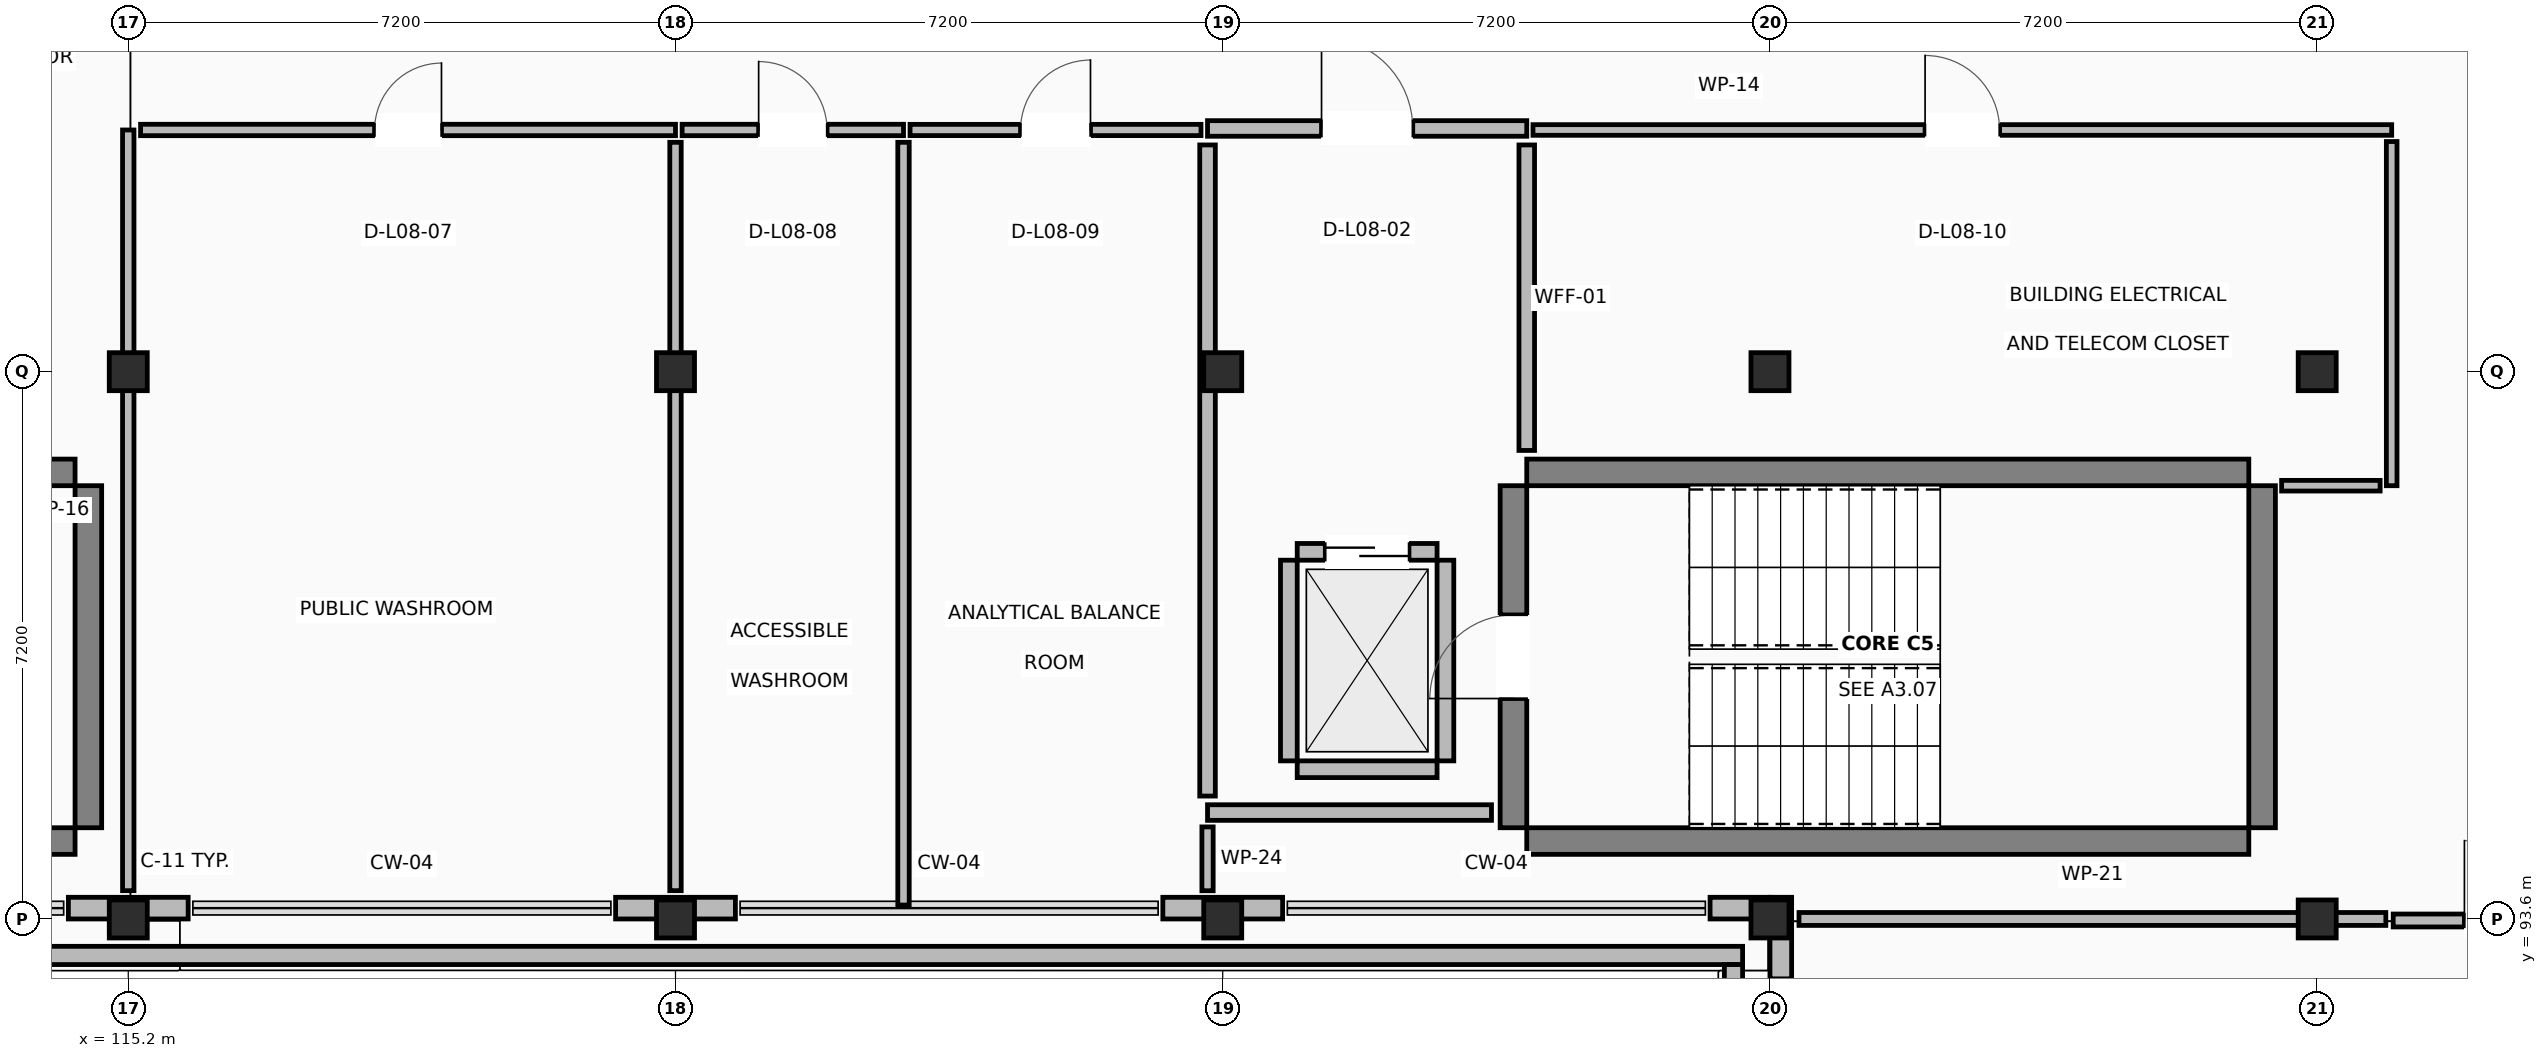
"""IFC4 building model, lengths in metres.
Left out: names, types, materials, properties, quantities, classifications, styles, units other than length and angle.
Written with IfcOpenShell. Run it as: python <this file> out.ifc"""

import sys

from ifc_helpers import new_model, si_unit, direction, frame, frame_2d, origin, origin_2d, place, context, subcontext, project, spatial, rectangle, extrude, element, fill, save


model = new_model("IFC4")
c1 = context("Model", 3, precision=1e-05, world=origin(), true_north=direction((0.0, 1.0)))
c2 = subcontext(c1, "Body", "Model", "MODEL_VIEW")
j1 = project(units=[si_unit("LENGTHUNIT", "METRE"), si_unit("PLANEANGLEUNIT", "RADIAN")], contexts=[c1])
p1 = place(None, origin())
s1 = spatial("IfcSite", under=j1, at=p1, CompositionType="ELEMENT")
p2 = place(p1, origin())
s2 = spatial("IfcBuilding", under=s1, at=p2, CompositionType="ELEMENT")
p3 = place(p2, frame((0.0, 0.0, 35.4)))
s3 = spatial("IfcBuildingStorey", under=s2, at=p3, CompositionType="ELEMENT", Elevation=35.4)
for number, where, z_axis, x_axis in (
    (1, (115.2, 93.6, 0.0), (0.0, 0.0, 1.0), (1.0, 0.0, 0.0)),
    (2, (115.2, 100.8, 0.0), (0.0, 0.0, 1.0), (1.0, 0.0, 0.0)),
    (3, (122.4, 93.6, 0.0), (0.0, 0.0, 1.0), (1.0, 0.0, 0.0)),
    (4, (122.4, 100.8, 0.0), (0.0, 0.0, 1.0), (1.0, 0.0, 0.0)),
    (5, (129.6, 93.6, 0.0), (0.0, 0.0, 1.0), (1.0, 0.0, 0.0)),
    (6, (129.6, 100.8, 0.0), (0.0, 0.0, 1.0), (1.0, 0.0, 0.0)),
    (7, (136.8, 93.6, 0.0), (0.0, 0.0, 1.0), (1.0, 0.0, 0.0)),
    (8, (136.8, 100.8, 0.0), (0.0, 0.0, 1.0), (1.0, 0.0, 0.0)),
    (9, (144.0, 93.6, 0.0), (0.0, 0.0, 1.0), (1.0, 0.0, 0.0)),
    (10, (144.0, 100.8, 0.0), (0.0, 0.0, 1.0), (1.0, 0.0, 0.0)),
):
    element("IfcColumn", number, at=place(p3, frame(where, z_axis=z_axis, x_axis=x_axis)), inside=s3, PredefinedType="COLUMN", context=c2, shape_type="SweptSolid", body=[
        extrude(rectangle(XDim=0.5, YDim=0.5, at=origin_2d()), origin(), (0.0, 0.0, 1.0), 3.92),
    ])
for number, where, z_axis, x_axis in (
    (11, (105.0, 94.625, 0.0), (0.0, 0.0, 1.0), (1.0, 0.0, 0.0)),
    (12, (105.0, 99.475, 0.0), (0.0, 0.0, 1.0), (1.0, 0.0, 0.0)),
):
    element("IfcWall", number, at=place(p3, frame(where, z_axis=z_axis, x_axis=x_axis)), inside=s3, PredefinedType="SHEAR", context=c2, shape_type="SweptSolid", body=[
        extrude(rectangle(XDim=9.5, YDim=0.35, at=frame_2d((4.75, 0.0))), origin(), (0.0, 0.0, 1.0), 3.92),
    ])
p4 = place(p3, frame((114.675, 94.8, 0.0), z_axis=(0.0, 0.0, 1.0), x_axis=(0.0, 1.0, 0.0)))
e13 = element("IfcWall", 13, at=p4, inside=s3, PredefinedType="SHEAR", context=c2, shape_type="SweptSolid", body=[
    extrude(rectangle(XDim=4.5, YDim=0.35, at=frame_2d((2.25, 0.0))), origin(), (0.0, 0.0, 1.0), 3.92),
])
for number, where, z_axis, x_axis in (
    (14, (133.6, 94.625, 0.0), (0.0, 0.0, 1.0), (1.0, 0.0, 0.0)),
    (15, (133.6, 99.475, 0.0), (0.0, 0.0, 1.0), (1.0, 0.0, 0.0)),
):
    element("IfcWall", number, at=place(p3, frame(where, z_axis=z_axis, x_axis=x_axis)), inside=s3, PredefinedType="SHEAR", context=c2, shape_type="SweptSolid", body=[
        extrude(rectangle(XDim=9.5, YDim=0.35, at=frame_2d((4.75, 0.0))), origin(), (0.0, 0.0, 1.0), 3.92),
    ])
p5 = place(p3, frame((133.425, 94.8, 0.0), z_axis=(0.0, 0.0, 1.0), x_axis=(0.0, 1.0, 0.0)))
e16 = element("IfcWall", 16, at=p5, inside=s3, PredefinedType="SHEAR", context=c2, shape_type="SweptSolid", body=[
    extrude(rectangle(XDim=4.5, YDim=0.35, at=frame_2d((2.25, 0.0))), origin(), (0.0, 0.0, 1.0), 3.92),
])
p6 = place(p5, frame((1.7, 0.0, 0.0)))
e17 = element("IfcOpeningElement", 17, at=p6, cuts=e16, PredefinedType="OPENING", context=c2, shape_type="SweptSolid", body=[
    extrude(rectangle(XDim=1.1, YDim=2.15, at=frame_2d((0.55, 1.075))), frame((0.0, 0.185, 0.0), z_axis=(0.0, -1.0, 0.0), x_axis=(1.0, 0.0, 0.0)), (0.0, 0.0, 1.0), 0.37),
])
p7 = place(p3, frame((143.275, 94.8, 0.0), z_axis=(0.0, 0.0, 1.0), x_axis=(0.0, 1.0, 0.0)))
e18 = element("IfcWall", 18, at=p7, inside=s3, PredefinedType="SHEAR", context=c2, shape_type="SweptSolid", body=[
    extrude(rectangle(XDim=4.5, YDim=0.35, at=frame_2d((2.25, 0.0))), origin(), (0.0, 0.0, 1.0), 3.92),
])
for number, where, z_axis, x_axis in (
    (19, (114.412, 93.742, 0.0), (0.0, 0.0, 1.0), (1.0, 0.0, 0.0)),
    (20, (121.612, 93.742, 0.0), (0.0, 0.0, 1.0), (1.0, 0.0, 0.0)),
    (21, (128.812, 93.742, 0.0), (0.0, 0.0, 1.0), (1.0, 0.0, 0.0)),
):
    element("IfcWall", number, at=place(p3, frame(where, z_axis=z_axis, x_axis=x_axis)), inside=s3, PredefinedType="STANDARD", context=c2, shape_type="SweptSolid", body=[
        extrude(rectangle(XDim=1.576, YDim=0.285, at=frame_2d((0.788, 0.0))), origin(), (0.0, 0.0, 1.0), 2.96),
    ])
p8 = place(p3, frame((136.012, 93.742, 0.0), z_axis=(0.0, 0.0, 1.0), x_axis=(1.0, 0.0, 0.0)))
e22 = element("IfcWall", 22, at=p8, inside=s3, PredefinedType="STANDARD", context=c2, shape_type="SweptSolid", body=[
    extrude(rectangle(XDim=0.788, YDim=0.285, at=frame_2d((0.394, 0.0))), origin(), (0.0, 0.0, 1.0), 2.96),
])
p9 = place(p3, frame((136.942, 93.885, 0.0), z_axis=(0.0, 0.0, 1.0), x_axis=(0.0, -1.0, 0.0)))
e23 = element("IfcWall", 23, at=p9, inside=s3, PredefinedType="STANDARD", context=c2, shape_type="SweptSolid", body=[
    extrude(rectangle(XDim=1.073, YDim=0.285, at=frame_2d((0.537, 0.0))), origin(), (0.0, 0.0, 1.0), 2.96),
])
p10 = place(p3, frame((136.44, 93.12, 0.0), z_axis=(0.0, 0.0, 1.0), x_axis=(-1.0, 0.0, 0.0)))
e24 = element("IfcWall", 24, at=p10, inside=s3, PredefinedType="PARAPET", context=c2, shape_type="SweptSolid", body=[
    extrude(rectangle(XDim=50.64, YDim=0.24, at=frame_2d((25.32, 0.0))), origin(), (0.0, 0.0, 1.0), 1.12),
])
p11 = place(p3, frame((136.32, 86.04, 0.0), z_axis=(0.0, 0.0, 1.0), x_axis=(0.0, 1.0, 0.0)))
e25 = element("IfcWall", 25, at=p11, inside=s3, PredefinedType="PARAPET", context=c2, shape_type="SweptSolid", body=[
    extrude(rectangle(XDim=6.96, YDim=0.24, at=frame_2d((3.48, 0.0))), origin(), (0.0, 0.0, 1.0), 1.12),
])
p12 = place(p3, frame((130.58, 95.57, 0.0), z_axis=(0.0, 0.0, 1.0), x_axis=(1.0, 0.0, 0.0)))
e26 = element("IfcWall", 26, at=p12, inside=s3, PredefinedType="STANDARD", context=c2, shape_type="SweptSolid", body=[
    extrude(rectangle(XDim=1.84, YDim=0.22, at=frame_2d((0.92, 0.0))), origin(), (0.0, 0.0, 1.0), 2.96),
])
p13 = place(p3, frame((130.58, 98.43, 0.0), z_axis=(0.0, 0.0, 1.0), x_axis=(1.0, 0.0, 0.0)))
e27 = element("IfcWall", 27, at=p13, inside=s3, PredefinedType="STANDARD", context=c2, shape_type="SweptSolid", body=[
    extrude(rectangle(XDim=1.84, YDim=0.22, at=frame_2d((0.92, 0.0))), origin(), (0.0, 0.0, 1.0), 2.96),
])
p14 = place(p13, frame((0.37, 0.0, 0.0)))
e28 = element("IfcOpeningElement", 28, at=p14, cuts=e27, PredefinedType="OPENING", context=c2, shape_type="SweptSolid", body=[
    extrude(rectangle(XDim=1.1, YDim=2.15, at=frame_2d((0.55, 1.075))), frame((0.0, 0.12, 0.0), z_axis=(0.0, -1.0, 0.0), x_axis=(1.0, 0.0, 0.0)), (0.0, 0.0, 1.0), 0.24),
])
for number, where, z_axis, x_axis in (
    (29, (130.47, 95.68, 0.0), (0.0, 0.0, 1.0), (0.0, 1.0, 0.0)),
    (30, (132.53, 95.68, 0.0), (0.0, 0.0, 1.0), (0.0, 1.0, 0.0)),
):
    element("IfcWall", number, at=place(p3, frame(where, z_axis=z_axis, x_axis=x_axis)), inside=s3, PredefinedType="STANDARD", context=c2, shape_type="SweptSolid", body=[
        extrude(rectangle(XDim=2.64, YDim=0.22, at=frame_2d((1.32, 0.0))), origin(), (0.0, 0.0, 1.0), 2.96),
    ])
p15 = place(p3, frame((129.4, 104.0, 0.0), z_axis=(0.0, 0.0, 1.0), x_axis=(1.0, 0.0, 0.0)))
e31 = element("IfcWall", 31, at=p15, inside=s3, PredefinedType="PARTITIONING", context=c2, shape_type="SweptSolid", body=[
    extrude(rectangle(XDim=4.2, YDim=0.205, at=frame_2d((2.1, 0.0))), origin(), (0.0, 0.0, 1.0), 2.96),
])
p16 = place(p15, frame((1.5, 0.0, 0.0)))
e32 = element("IfcOpeningElement", 32, at=p16, cuts=e31, PredefinedType="OPENING", context=c2, shape_type="SweptSolid", body=[
    extrude(rectangle(XDim=1.2, YDim=2.15, at=frame_2d((0.6, 1.075))), frame((0.0, 0.113, 0.0), z_axis=(0.0, -1.0, 0.0), x_axis=(1.0, 0.0, 0.0)), (0.0, 0.0, 1.0), 0.225),
])
p17 = place(p3, frame((133.6, 103.783, 0.0), z_axis=(0.0, 0.0, 1.0), x_axis=(0.0, -1.0, 0.0)))
e33 = element("IfcWall", 33, at=p17, inside=s3, PredefinedType="PARTITIONING", context=c2, shape_type="SweptSolid", body=[
    extrude(rectangle(XDim=4.019, YDim=0.205, at=frame_2d((2.01, 0.0))), origin(), (0.0, 0.0, 1.0), 2.96),
])
p18 = place(p3, frame((133.136, 95.0, 0.0), z_axis=(0.0, 0.0, 1.0), x_axis=(-1.0, 0.0, 0.0)))
e34 = element("IfcWall", 34, at=p18, inside=s3, PredefinedType="PARTITIONING", context=c2, shape_type="SweptSolid", body=[
    extrude(rectangle(XDim=3.736, YDim=0.205, at=frame_2d((1.868, 0.0))), origin(), (0.0, 0.0, 1.0), 2.96),
])
p19 = place(p3, frame((129.4, 95.217, 0.0), z_axis=(0.0, 0.0, 1.0), x_axis=(0.0, 1.0, 0.0)))
e35 = element("IfcWall", 35, at=p19, inside=s3, PredefinedType="PARTITIONING", context=c2, shape_type="SweptSolid", body=[
    extrude(rectangle(XDim=8.566, YDim=0.205, at=frame_2d((4.283, 0.0))), origin(), (0.0, 0.0, 1.0), 2.96),
])
p20 = place(p3, frame((115.2, 93.972, 0.0), z_axis=(0.0, 0.0, 1.0), x_axis=(0.0, 1.0, 0.0)))
e36 = element("IfcWall", 36, at=p20, inside=s3, PredefinedType="PARTITIONING", context=c2, shape_type="SweptSolid", body=[
    extrude(rectangle(XDim=10.008, YDim=0.15, at=frame_2d((5.004, 0.0))), origin(), (0.0, 0.0, 1.0), 2.96),
])
p21 = place(p3, frame((115.362, 103.98, 0.0), z_axis=(0.0, 0.0, 1.0), x_axis=(1.0, 0.0, 0.0)))
e37 = element("IfcWall", 37, at=p21, inside=s3, PredefinedType="PARTITIONING", context=c2, shape_type="SweptSolid", body=[
    extrude(rectangle(XDim=7.038, YDim=0.15, at=frame_2d((3.519, 0.0))), origin(), (0.0, 0.0, 1.0), 2.96),
])
p22 = place(p21, frame((3.079, 0.0, 0.0)))
e38 = element("IfcOpeningElement", 38, at=p22, cuts=e37, PredefinedType="OPENING", context=c2, shape_type="SweptSolid", body=[
    extrude(rectangle(XDim=0.88, YDim=2.1, at=frame_2d((0.44, 1.05))), frame((0.0, 0.085, 0.0), z_axis=(0.0, -1.0, 0.0), x_axis=(1.0, 0.0, 0.0)), (0.0, 0.0, 1.0), 0.17),
])
p23 = place(p3, frame((122.4, 103.818, 0.0), z_axis=(0.0, 0.0, 1.0), x_axis=(0.0, -1.0, 0.0)))
e39 = element("IfcWall", 39, at=p23, inside=s3, PredefinedType="PARTITIONING", context=c2, shape_type="SweptSolid", body=[
    extrude(rectangle(XDim=9.846, YDim=0.15, at=frame_2d((4.923, 0.0))), origin(), (0.0, 0.0, 1.0), 2.96),
])
p24 = place(p3, frame((122.487, 103.98, 0.0), z_axis=(0.0, 0.0, 1.0), x_axis=(1.0, 0.0, 0.0)))
e40 = element("IfcWall", 40, at=p24, inside=s3, PredefinedType="PARTITIONING", context=c2, shape_type="SweptSolid", body=[
    extrude(rectangle(XDim=2.913, YDim=0.15, at=frame_2d((1.457, 0.0))), origin(), (0.0, 0.0, 1.0), 2.96),
])
p25 = place(p24, frame((1.007, 0.0, 0.0)))
e41 = element("IfcOpeningElement", 41, at=p25, cuts=e40, PredefinedType="OPENING", context=c2, shape_type="SweptSolid", body=[
    extrude(rectangle(XDim=0.9, YDim=2.1, at=frame_2d((0.45, 1.05))), frame((0.0, 0.085, 0.0), z_axis=(0.0, -1.0, 0.0), x_axis=(1.0, 0.0, 0.0)), (0.0, 0.0, 1.0), 0.17),
])
p26 = place(p3, frame((125.4, 103.818, 0.0), z_axis=(0.0, 0.0, 1.0), x_axis=(0.0, -1.0, 0.0)))
e42 = element("IfcWall", 42, at=p26, inside=s3, PredefinedType="PARTITIONING", context=c2, shape_type="SweptSolid", body=[
    extrude(rectangle(XDim=10.035, YDim=0.15, at=frame_2d((5.018, 0.0))), origin(), (0.0, 0.0, 1.0), 2.96),
])
p27 = place(p3, frame((125.486, 103.98, 0.0), z_axis=(0.0, 0.0, 1.0), x_axis=(1.0, 0.0, 0.0)))
e43 = element("IfcWall", 43, at=p27, inside=s3, PredefinedType="PARTITIONING", context=c2, shape_type="SweptSolid", body=[
    extrude(rectangle(XDim=3.828, YDim=0.148, at=frame_2d((1.914, 0.0))), origin(), (0.0, 0.0, 1.0), 2.96),
])
p28 = place(p27, frame((1.454, 0.0, 0.0)))
e44 = element("IfcOpeningElement", 44, at=p28, cuts=e43, PredefinedType="OPENING", context=c2, shape_type="SweptSolid", body=[
    extrude(rectangle(XDim=0.92, YDim=2.1, at=frame_2d((0.46, 1.05))), frame((0.0, 0.084, 0.0), z_axis=(0.0, -1.0, 0.0), x_axis=(1.0, 0.0, 0.0)), (0.0, 0.0, 1.0), 0.168),
])
p29 = place(p3, frame((129.4, 94.811, 0.0), z_axis=(0.0, 0.0, 1.0), x_axis=(0.0, -1.0, 0.0)))
e45 = element("IfcWall", 45, at=p29, inside=s3, PredefinedType="PARTITIONING", context=c2, shape_type="SweptSolid", body=[
    extrude(rectangle(XDim=0.84, YDim=0.148, at=frame_2d((0.42, 0.0))), origin(), (0.0, 0.0, 1.0), 2.96),
])
p30 = place(p3, frame((133.682, 103.98, 0.0), z_axis=(0.0, 0.0, 1.0), x_axis=(1.0, 0.0, 0.0)))
e46 = element("IfcWall", 46, at=p30, inside=s3, PredefinedType="PARTITIONING", context=c2, shape_type="SweptSolid", body=[
    extrude(rectangle(XDim=11.298, YDim=0.14, at=frame_2d((5.649, 0.0))), origin(), (0.0, 0.0, 1.0), 2.96),
])
p31 = place(p30, frame((5.159, 0.0, 0.0)))
e47 = element("IfcOpeningElement", 47, at=p31, cuts=e46, PredefinedType="OPENING", context=c2, shape_type="SweptSolid", body=[
    extrude(rectangle(XDim=0.98, YDim=2.1, at=frame_2d((0.49, 1.05))), frame((0.0, 0.08, 0.0), z_axis=(0.0, -1.0, 0.0), x_axis=(1.0, 0.0, 0.0)), (0.0, 0.0, 1.0), 0.16),
])
p32 = place(p3, frame((144.98, 103.828, 0.0), z_axis=(0.0, 0.0, 1.0), x_axis=(0.0, -1.0, 0.0)))
e48 = element("IfcWall", 48, at=p32, inside=s3, PredefinedType="PARTITIONING", context=c2, shape_type="SweptSolid", body=[
    extrude(rectangle(XDim=4.528, YDim=0.14, at=frame_2d((2.264, 0.0))), origin(), (0.0, 0.0, 1.0), 2.96),
])
p33 = place(p3, frame((144.828, 99.3, 0.0), z_axis=(0.0, 0.0, 1.0), x_axis=(-1.0, 0.0, 0.0)))
e49 = element("IfcWall", 49, at=p33, inside=s3, PredefinedType="PARTITIONING", context=c2, shape_type="SweptSolid", body=[
    extrude(rectangle(XDim=1.296, YDim=0.14, at=frame_2d((0.648, 0.0))), origin(), (0.0, 0.0, 1.0), 2.96),
])
p34 = place(p3, frame((145.0, 93.58, 0.0), z_axis=(0.0, 0.0, 1.0), x_axis=(1.0, 0.0, 0.0)))
e50 = element("IfcWall", 50, at=p34, inside=s3, PredefinedType="PARTITIONING", context=c2, shape_type="SweptSolid", body=[
    extrude(rectangle(XDim=2.923, YDim=0.17, at=frame_2d((1.461, 0.0))), origin(), (0.0, 0.0, 1.0), 2.96),
])
p35 = place(p34, frame((0.937, 0.0, 0.0)))
e51 = element("IfcOpeningElement", 51, at=p35, cuts=e50, PredefinedType="OPENING", context=c2, shape_type="SweptSolid", body=[
    extrude(rectangle(XDim=1.05, YDim=2.15, at=frame_2d((0.525, 1.075))), frame((0.0, 0.095, 0.0), z_axis=(0.0, -1.0, 0.0), x_axis=(1.0, 0.0, 0.0)), (0.0, 0.0, 1.0), 0.19),
])
p36 = place(p3, frame((137.182, 93.6, 0.0), z_axis=(0.0, 0.0, 1.0), x_axis=(1.0, 0.0, 0.0)))
e52 = element("IfcWall", 52, at=p36, inside=s3, PredefinedType="PARTITIONING", context=c2, shape_type="SweptSolid", body=[
    extrude(rectangle(XDim=7.721, YDim=0.17, at=frame_2d((3.861, 0.0))), origin(), (0.0, 0.0, 1.0), 2.96),
])
p37 = place(p6, origin())
e53 = element("IfcDoor", 53, at=p37, inside=s3, OperationType="SINGLE_SWING_LEFT", PredefinedType="DOOR", context=c2, shape_type="SweptSolid", body=[
    extrude(rectangle(XDim=1.1, YDim=2.15, at=frame_2d((0.55, 1.075))), frame((0.0, 0.025, 0.0), z_axis=(0.0, -1.0, 0.0), x_axis=(1.0, 0.0, 0.0)), (0.0, 0.0, 1.0), 0.05),
])
fill(e17, e53)
p38 = place(p14, origin())
e54 = element("IfcDoor", 54, at=p38, inside=s3, OperationType="SLIDING_TO_LEFT", PredefinedType="DOOR", context=c2, shape_type="SweptSolid", body=[
    extrude(rectangle(XDim=1.1, YDim=2.15, at=frame_2d((0.55, 1.075))), frame((0.0, 0.025, 0.0), z_axis=(0.0, -1.0, 0.0), x_axis=(1.0, 0.0, 0.0)), (0.0, 0.0, 1.0), 0.05),
])
fill(e28, e54)
p39 = place(p16, origin())
e55 = element("IfcDoor", 55, at=p39, inside=s3, OperationType="SINGLE_SWING_LEFT", PredefinedType="DOOR", context=c2, shape_type="SweptSolid", body=[
    extrude(rectangle(XDim=1.2, YDim=2.15, at=frame_2d((0.6, 1.075))), frame((0.0, 0.025, 0.0), z_axis=(0.0, -1.0, 0.0), x_axis=(1.0, 0.0, 0.0)), (0.0, 0.0, 1.0), 0.05),
])
fill(e32, e55)
p40 = place(p22, origin())
e56 = element("IfcDoor", 56, at=p40, inside=s3, OperationType="SINGLE_SWING_RIGHT", PredefinedType="DOOR", context=c2, shape_type="SweptSolid", body=[
    extrude(rectangle(XDim=0.88, YDim=2.1, at=frame_2d((0.44, 1.05))), frame((0.0, 0.025, 0.0), z_axis=(0.0, -1.0, 0.0), x_axis=(1.0, 0.0, 0.0)), (0.0, 0.0, 1.0), 0.05),
])
fill(e38, e56)
p41 = place(p25, origin())
e57 = element("IfcDoor", 57, at=p41, inside=s3, OperationType="SINGLE_SWING_LEFT", PredefinedType="DOOR", context=c2, shape_type="SweptSolid", body=[
    extrude(rectangle(XDim=0.9, YDim=2.1, at=frame_2d((0.45, 1.05))), frame((0.0, 0.025, 0.0), z_axis=(0.0, -1.0, 0.0), x_axis=(1.0, 0.0, 0.0)), (0.0, 0.0, 1.0), 0.05),
])
fill(e41, e57)
p42 = place(p28, origin())
e58 = element("IfcDoor", 58, at=p42, inside=s3, OperationType="SINGLE_SWING_RIGHT", PredefinedType="DOOR", context=c2, shape_type="SweptSolid", body=[
    extrude(rectangle(XDim=0.92, YDim=2.1, at=frame_2d((0.46, 1.05))), frame((0.0, 0.025, 0.0), z_axis=(0.0, -1.0, 0.0), x_axis=(1.0, 0.0, 0.0)), (0.0, 0.0, 1.0), 0.05),
])
fill(e44, e58)
p43 = place(p31, origin())
e59 = element("IfcDoor", 59, at=p43, inside=s3, OperationType="SINGLE_SWING_LEFT", PredefinedType="DOOR", context=c2, shape_type="SweptSolid", body=[
    extrude(rectangle(XDim=0.98, YDim=2.1, at=frame_2d((0.49, 1.05))), frame((0.0, 0.025, 0.0), z_axis=(0.0, -1.0, 0.0), x_axis=(1.0, 0.0, 0.0)), (0.0, 0.0, 1.0), 0.05),
])
fill(e47, e59)
p44 = place(p35, origin())
e60 = element("IfcDoor", 60, at=p44, inside=s3, OperationType="SINGLE_SWING_LEFT", PredefinedType="DOOR", context=c2, shape_type="SweptSolid", body=[
    extrude(rectangle(XDim=1.05, YDim=2.15, at=frame_2d((0.525, 1.075))), frame((0.0, 0.025, 0.0), z_axis=(0.0, -1.0, 0.0), x_axis=(1.0, 0.0, 0.0)), (0.0, 0.0, 1.0), 0.05),
])
fill(e51, e60)
save(model, sys.argv[1])
